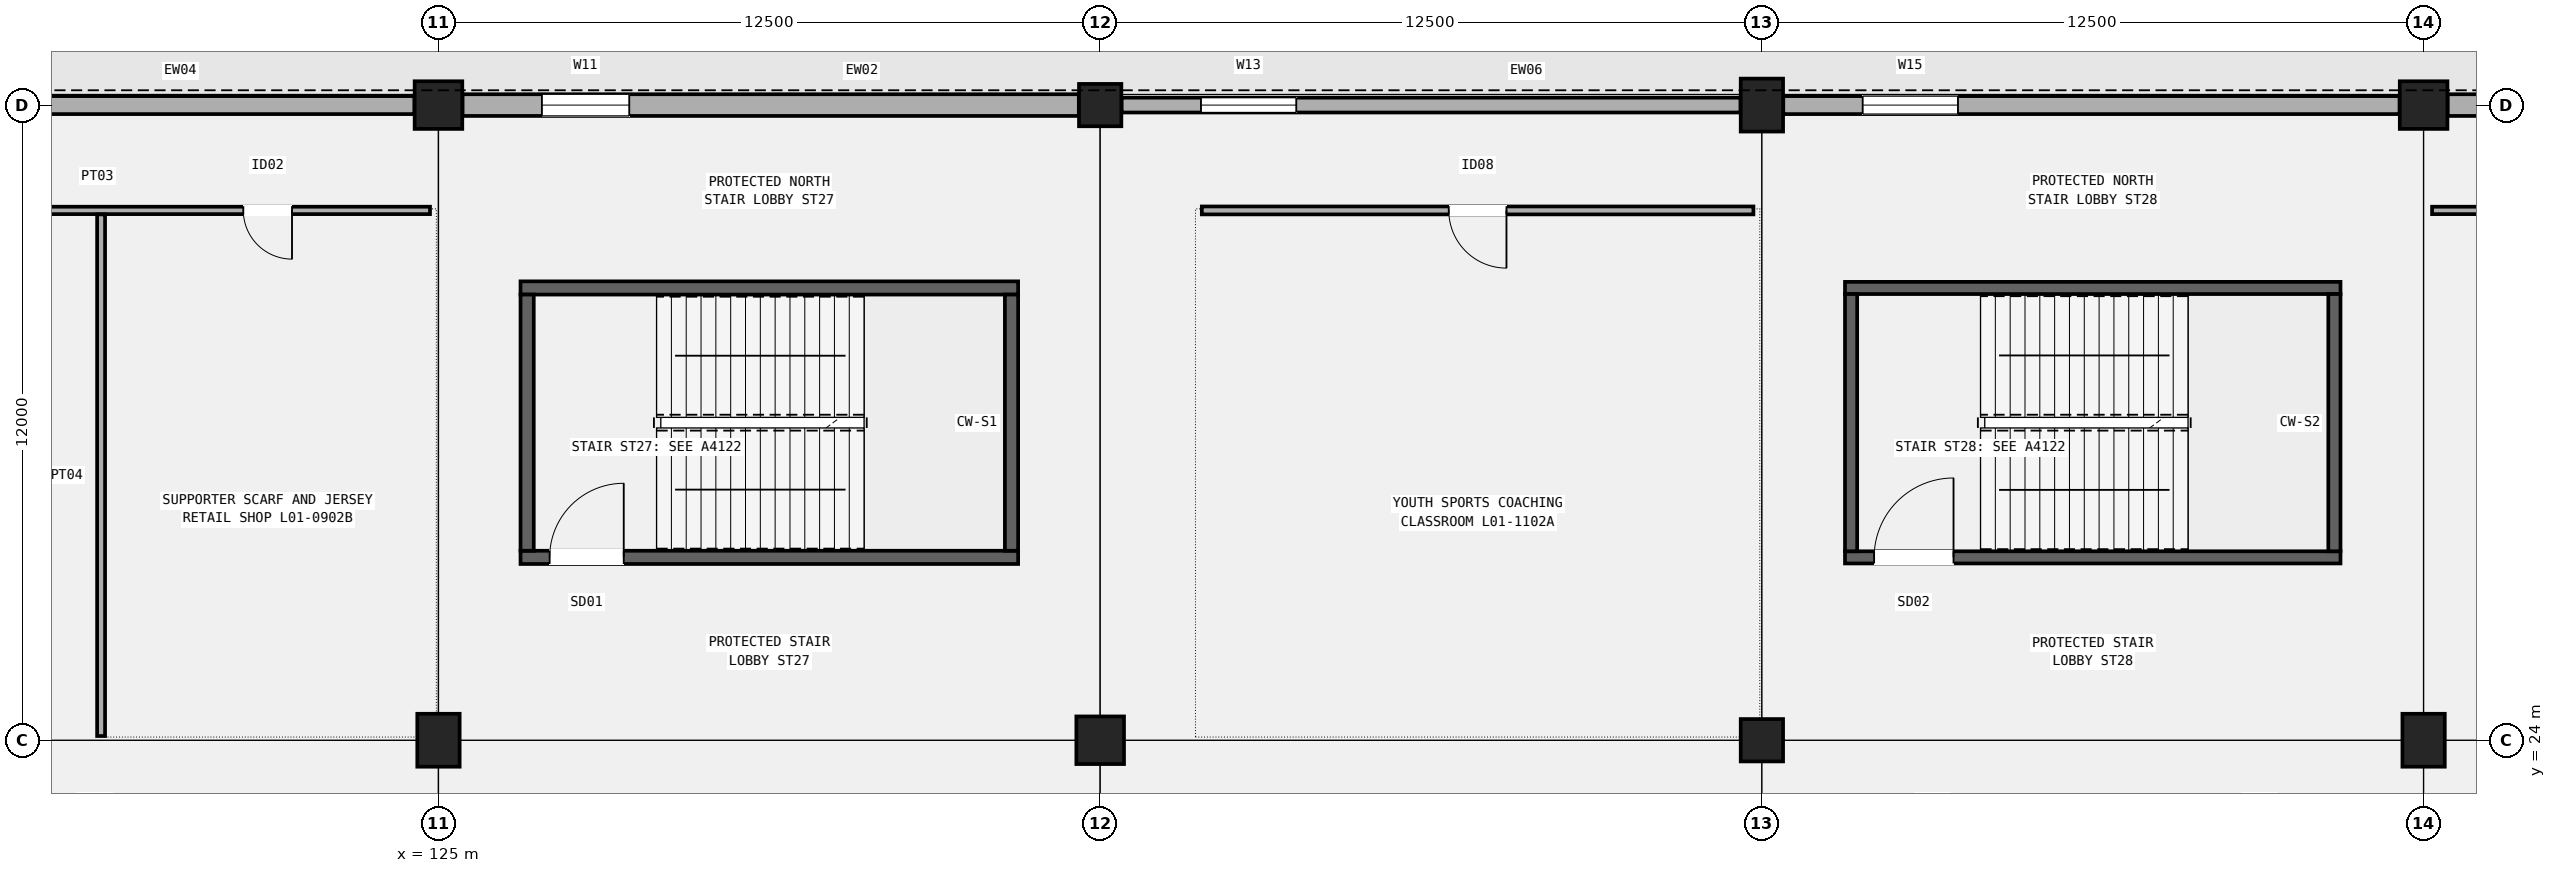
"""IFC4 building model, lengths in metres.
Left out: names, types, materials, properties, quantities, classifications, styles, units other than length and angle.
Written with IfcOpenShell. Run it as: python <this file> out.ifc"""

import sys

from ifc_helpers import new_model, si_unit, direction, frame, frame_2d, origin, origin_2d, place, context, subcontext, project, spatial, rectangle, extrude, element, fill, save


model = new_model("IFC4")
c1 = context("Model", 3, precision=1e-05, world=origin(), true_north=direction((0.0, 1.0)))
c2 = subcontext(c1, "Body", "Model", "MODEL_VIEW")
j1 = project(units=[si_unit("LENGTHUNIT", "METRE"), si_unit("PLANEANGLEUNIT", "RADIAN")], contexts=[c1])
p1 = place(None, origin())
s1 = spatial("IfcSite", under=j1, at=p1, CompositionType="ELEMENT")
p2 = place(p1, origin())
s2 = spatial("IfcBuilding", under=s1, at=p2, CompositionType="ELEMENT")
p3 = place(p2, frame((0.0, 0.0, 5.4)))
s3 = spatial("IfcBuildingStorey", under=s2, at=p3, CompositionType="ELEMENT", Elevation=5.4)
p4 = place(p3, frame((125.0, 24.0, 0.0), z_axis=(0.0, 0.0, 1.0), x_axis=(1.0, 0.0, 0.0)))
e1 = element("IfcColumn", 1, at=p4, inside=s3, PredefinedType="COLUMN", context=c2, shape_type="SweptSolid", body=[
    extrude(rectangle(XDim=0.8, YDim=1.0, at=origin_2d()), origin(), (0.0, 0.0, 1.0), 4.8),
])
for number, where, z_axis, x_axis in (
    (2, (125.0, 36.0, 0.0), (0.0, 0.0, 1.0), (1.0, 0.0, 0.0)),
    (3, (137.5, 24.0, 0.0), (0.0, 0.0, 1.0), (1.0, 0.0, 0.0)),
):
    element("IfcColumn", number, at=place(p3, frame(where, z_axis=z_axis, x_axis=x_axis)), inside=s3, PredefinedType="COLUMN", context=c2, shape_type="SweptSolid", body=[
        extrude(rectangle(XDim=0.9, YDim=0.9, at=origin_2d()), origin(), (0.0, 0.0, 1.0), 4.8),
    ])
for number, where, z_axis, x_axis in (
    (4, (137.5, 36.0, 0.0), (0.0, 0.0, 1.0), (1.0, 0.0, 0.0)),
    (5, (150.0, 24.0, 0.0), (0.0, 0.0, 1.0), (1.0, 0.0, 0.0)),
):
    element("IfcColumn", number, at=place(p3, frame(where, z_axis=z_axis, x_axis=x_axis)), inside=s3, PredefinedType="COLUMN", context=c2, shape_type="SweptSolid", body=[
        extrude(rectangle(XDim=0.8, YDim=0.8, at=origin_2d()), origin(), (0.0, 0.0, 1.0), 4.8),
    ])
for number, where, z_axis, x_axis in (
    (6, (150.0, 36.0, 0.0), (0.0, 0.0, 1.0), (1.0, 0.0, 0.0)),
    (7, (162.5, 24.0, 0.0), (0.0, 0.0, 1.0), (1.0, 0.0, 0.0)),
):
    element("IfcColumn", number, at=place(p3, frame(where, z_axis=z_axis, x_axis=x_axis)), inside=s3, PredefinedType="COLUMN", context=c2, shape_type="SweptSolid", body=[
        extrude(rectangle(XDim=0.8, YDim=1.0, at=origin_2d()), origin(), (0.0, 0.0, 1.0), 4.8),
    ])
p5 = place(p3, frame((162.5, 36.0, 0.0), z_axis=(0.0, 0.0, 1.0), x_axis=(1.0, 0.0, 0.0)))
e8 = element("IfcColumn", 8, at=p5, inside=s3, PredefinedType="COLUMN", context=c2, shape_type="SweptSolid", body=[
    extrude(rectangle(XDim=0.9, YDim=0.9, at=origin_2d()), origin(), (0.0, 0.0, 1.0), 4.8),
])
p6 = place(p3, frame((112.404, 36.0, 0.0), z_axis=(0.0, 0.0, 1.0), x_axis=(1.0, 0.0, 0.0)))
e9 = element("IfcWall", 9, at=p6, inside=s3, PredefinedType="SOLIDWALL", context=c2, shape_type="SweptSolid", body=[
    extrude(rectangle(XDim=12.142, YDim=0.34, at=frame_2d((6.071, 0.0))), origin(), (0.0, 0.0, 1.0), 4.15),
])
p7 = place(p6, frame((1.5, 0.0, 0.95)))
e10 = element("IfcOpeningElement", 10, at=p7, cuts=e9, PredefinedType="OPENING", context=c2, shape_type="SweptSolid", body=[
    extrude(rectangle(XDim=1.5, YDim=1.8, at=frame_2d((0.75, 0.9))), frame((0.0, 0.18, 0.0), z_axis=(0.0, -1.0, 0.0), x_axis=(1.0, 0.0, 0.0)), (0.0, 0.0, 1.0), 0.36),
])
p8 = place(p3, frame((125.454, 36.0, 0.0), z_axis=(0.0, 0.0, 1.0), x_axis=(1.0, 0.0, 0.0)))
e11 = element("IfcWall", 11, at=p8, inside=s3, PredefinedType="SOLIDWALL", context=c2, shape_type="SweptSolid", body=[
    extrude(rectangle(XDim=11.642, YDim=0.41, at=frame_2d((5.821, 0.0))), origin(), (0.0, 0.0, 1.0), 4.2),
])
p9 = place(p8, frame((1.5, 0.0, 0.95)))
e12 = element("IfcOpeningElement", 12, at=p9, cuts=e11, PredefinedType="OPENING", context=c2, shape_type="SweptSolid", body=[
    extrude(rectangle(XDim=1.65, YDim=2.05, at=frame_2d((0.825, 1.025))), frame((0.0, 0.215, 0.0), z_axis=(0.0, -1.0, 0.0), x_axis=(1.0, 0.0, 0.0)), (0.0, 0.0, 1.0), 0.43),
])
p10 = place(p3, frame((137.904, 36.0, 0.0), z_axis=(0.0, 0.0, 1.0), x_axis=(1.0, 0.0, 0.0)))
e13 = element("IfcWall", 13, at=p10, inside=s3, PredefinedType="SOLIDWALL", context=c2, shape_type="SweptSolid", body=[
    extrude(rectangle(XDim=11.692, YDim=0.28, at=frame_2d((5.846, 0.0))), origin(), (0.0, 0.0, 1.0), 4.15),
])
p11 = place(p10, frame((1.5, 0.0, 0.95)))
e14 = element("IfcOpeningElement", 14, at=p11, cuts=e13, PredefinedType="OPENING", context=c2, shape_type="SweptSolid", body=[
    extrude(rectangle(XDim=1.8, YDim=1.75, at=frame_2d((0.9, 0.875))), frame((0.0, 0.15, 0.0), z_axis=(0.0, -1.0, 0.0), x_axis=(1.0, 0.0, 0.0)), (0.0, 0.0, 1.0), 0.3),
])
p12 = place(p3, frame((150.404, 36.0, 0.0), z_axis=(0.0, 0.0, 1.0), x_axis=(1.0, 0.0, 0.0)))
e15 = element("IfcWall", 15, at=p12, inside=s3, PredefinedType="SOLIDWALL", context=c2, shape_type="SweptSolid", body=[
    extrude(rectangle(XDim=11.642, YDim=0.34, at=frame_2d((5.821, 0.0))), origin(), (0.0, 0.0, 1.0), 4.2),
])
p13 = place(p12, frame((1.5, 0.0, 0.95)))
e16 = element("IfcOpeningElement", 16, at=p13, cuts=e15, PredefinedType="OPENING", context=c2, shape_type="SweptSolid", body=[
    extrude(rectangle(XDim=1.8, YDim=2.55, at=frame_2d((0.9, 1.275))), frame((0.0, 0.18, 0.0), z_axis=(0.0, -1.0, 0.0), x_axis=(1.0, 0.0, 0.0)), (0.0, 0.0, 1.0), 0.36),
])
p14 = place(p3, frame((162.954, 36.0, 0.0), z_axis=(0.0, 0.0, 1.0), x_axis=(1.0, 0.0, 0.0)))
e17 = element("IfcWall", 17, at=p14, inside=s3, PredefinedType="SOLIDWALL", context=c2, shape_type="SweptSolid", body=[
    extrude(rectangle(XDim=11.642, YDim=0.41, at=frame_2d((5.821, 0.0))), origin(), (0.0, 0.0, 1.0), 4.15),
])
p15 = place(p14, frame((1.5, 0.0, 0.95)))
e18 = element("IfcOpeningElement", 18, at=p15, cuts=e17, PredefinedType="OPENING", context=c2, shape_type="SweptSolid", body=[
    extrude(rectangle(XDim=1.95, YDim=2.35, at=frame_2d((0.975, 1.175))), frame((0.0, 0.215, 0.0), z_axis=(0.0, -1.0, 0.0), x_axis=(1.0, 0.0, 0.0)), (0.0, 0.0, 1.0), 0.43),
])
p16 = place(p3, frame((126.55, 27.455, 0.0), z_axis=(0.0, 0.0, 1.0), x_axis=(1.0, 0.0, 0.0)))
e19 = element("IfcWall", 19, at=p16, inside=s3, PredefinedType="SHEAR", context=c2, shape_type="SweptSolid", body=[
    extrude(rectangle(XDim=9.4, YDim=0.25, at=frame_2d((4.7, 0.0))), origin(), (0.0, 0.0, 1.0), 4.55),
])
p17 = place(p16, frame((0.55, 0.0, 0.0)))
e20 = element("IfcOpeningElement", 20, at=p17, cuts=e19, PredefinedType="OPENING", context=c2, shape_type="SweptSolid", body=[
    extrude(rectangle(XDim=1.4, YDim=2.15, at=frame_2d((0.7, 1.075))), frame((0.0, 0.135, 0.0), z_axis=(0.0, -1.0, 0.0), x_axis=(1.0, 0.0, 0.0)), (0.0, 0.0, 1.0), 0.27),
])
p18 = place(p3, frame((126.55, 32.545, 0.0), z_axis=(0.0, 0.0, 1.0), x_axis=(1.0, 0.0, 0.0)))
e21 = element("IfcWall", 21, at=p18, inside=s3, PredefinedType="SHEAR", context=c2, shape_type="SweptSolid", body=[
    extrude(rectangle(XDim=9.4, YDim=0.25, at=frame_2d((4.7, 0.0))), origin(), (0.0, 0.0, 1.0), 4.55),
])
for number, where, z_axis, x_axis in (
    (22, (126.675, 27.58, 0.0), (0.0, 0.0, 1.0), (0.0, 1.0, 0.0)),
    (23, (135.825, 27.58, 0.0), (0.0, 0.0, 1.0), (0.0, 1.0, 0.0)),
):
    element("IfcWall", number, at=place(p3, frame(where, z_axis=z_axis, x_axis=x_axis)), inside=s3, PredefinedType="SHEAR", context=c2, shape_type="SweptSolid", body=[
        extrude(rectangle(XDim=4.84, YDim=0.25, at=frame_2d((2.42, 0.0))), origin(), (0.0, 0.0, 1.0), 4.55),
    ])
p19 = place(p3, frame((151.57, 27.455, 0.0), z_axis=(0.0, 0.0, 1.0), x_axis=(1.0, 0.0, 0.0)))
e24 = element("IfcWall", 24, at=p19, inside=s3, PredefinedType="SHEAR", context=c2, shape_type="SweptSolid", body=[
    extrude(rectangle(XDim=9.36, YDim=0.23, at=frame_2d((4.68, 0.0))), origin(), (0.0, 0.0, 1.0), 4.55),
])
p20 = place(p19, frame((0.55, 0.0, 0.0)))
e25 = element("IfcOpeningElement", 25, at=p20, cuts=e24, PredefinedType="OPENING", context=c2, shape_type="SweptSolid", body=[
    extrude(rectangle(XDim=1.5, YDim=2.2, at=frame_2d((0.75, 1.1))), frame((0.0, 0.125, 0.0), z_axis=(0.0, -1.0, 0.0), x_axis=(1.0, 0.0, 0.0)), (0.0, 0.0, 1.0), 0.25),
])
p21 = place(p3, frame((151.57, 32.545, 0.0), z_axis=(0.0, 0.0, 1.0), x_axis=(1.0, 0.0, 0.0)))
e26 = element("IfcWall", 26, at=p21, inside=s3, PredefinedType="SHEAR", context=c2, shape_type="SweptSolid", body=[
    extrude(rectangle(XDim=9.36, YDim=0.23, at=frame_2d((4.68, 0.0))), origin(), (0.0, 0.0, 1.0), 4.55),
])
for number, where, z_axis, x_axis in (
    (27, (151.685, 27.57, 0.0), (0.0, 0.0, 1.0), (0.0, 1.0, 0.0)),
    (28, (160.815, 27.57, 0.0), (0.0, 0.0, 1.0), (0.0, 1.0, 0.0)),
):
    element("IfcWall", number, at=place(p3, frame(where, z_axis=z_axis, x_axis=x_axis)), inside=s3, PredefinedType="SHEAR", context=c2, shape_type="SweptSolid", body=[
        extrude(rectangle(XDim=4.86, YDim=0.23, at=frame_2d((2.43, 0.0))), origin(), (0.0, 0.0, 1.0), 4.55),
    ])
p22 = place(p3, frame((112.16, 34.01, 0.0), z_axis=(0.0, 0.0, 1.0), x_axis=(1.0, 0.0, 0.0)))
e29 = element("IfcWall", 29, at=p22, inside=s3, PredefinedType="PARTITIONING", context=c2, shape_type="SweptSolid", body=[
    extrude(rectangle(XDim=12.68, YDim=0.14, at=frame_2d((6.34, 0.0))), origin(), (0.0, 0.0, 1.0), 3.92),
])
p23 = place(p22, frame((3.643, 0.0, 0.0), z_axis=(0.0, 0.0, 1.0), x_axis=(-1.0, 0.0, 0.0)))
e30 = element("IfcOpeningElement", 30, at=p23, cuts=e29, PredefinedType="OPENING", context=c2, shape_type="SweptSolid", body=[
    extrude(rectangle(XDim=0.9, YDim=2.06, at=frame_2d((0.45, 1.03))), frame((0.0, 0.08, 0.0), z_axis=(0.0, -1.0, 0.0), x_axis=(1.0, 0.0, 0.0)), (0.0, 0.0, 1.0), 0.16),
])
p24 = place(p22, frame((10.073, 0.0, 0.0), z_axis=(0.0, 0.0, 1.0), x_axis=(-1.0, 0.0, 0.0)))
e31 = element("IfcOpeningElement", 31, at=p24, cuts=e29, PredefinedType="OPENING", context=c2, shape_type="SweptSolid", body=[
    extrude(rectangle(XDim=0.92, YDim=2.1, at=frame_2d((0.46, 1.05))), frame((0.0, 0.08, 0.0), z_axis=(0.0, -1.0, 0.0), x_axis=(1.0, 0.0, 0.0)), (0.0, 0.0, 1.0), 0.16),
])
p25 = place(p3, frame((118.627, 24.08, 0.0), z_axis=(0.0, 0.0, 1.0), x_axis=(0.0, 1.0, 0.0)))
e32 = element("IfcWall", 32, at=p25, inside=s3, PredefinedType="PARTITIONING", context=c2, shape_type="SweptSolid", body=[
    extrude(rectangle(XDim=9.855, YDim=0.15, at=frame_2d((4.927, 0.0))), origin(), (0.0, 0.0, 1.0), 3.92),
])
p26 = place(p3, frame((139.42, 34.01, 0.0), z_axis=(0.0, 0.0, 1.0), x_axis=(1.0, 0.0, 0.0)))
e33 = element("IfcWall", 33, at=p26, inside=s3, PredefinedType="PARTITIONING", context=c2, shape_type="SweptSolid", body=[
    extrude(rectangle(XDim=10.42, YDim=0.15, at=frame_2d((5.21, 0.0))), origin(), (0.0, 0.0, 1.0), 3.92),
])
p27 = place(p26, frame((5.755, 0.0, 0.0), z_axis=(0.0, 0.0, 1.0), x_axis=(-1.0, 0.0, 0.0)))
e34 = element("IfcOpeningElement", 34, at=p27, cuts=e33, PredefinedType="OPENING", context=c2, shape_type="SweptSolid", body=[
    extrude(rectangle(XDim=1.09, YDim=2.16, at=frame_2d((0.545, 1.08))), frame((0.0, 0.085, 0.0), z_axis=(0.0, -1.0, 0.0), x_axis=(1.0, 0.0, 0.0)), (0.0, 0.0, 1.0), 0.17),
])
p28 = place(p3, frame((162.66, 34.01, 0.0), z_axis=(0.0, 0.0, 1.0), x_axis=(1.0, 0.0, 0.0)))
e35 = element("IfcWall", 35, at=p28, inside=s3, PredefinedType="PARTITIONING", context=c2, shape_type="SweptSolid", body=[
    extrude(rectangle(XDim=12.18, YDim=0.14, at=frame_2d((6.09, 0.0))), origin(), (0.0, 0.0, 1.0), 3.92),
])
p29 = place(p28, frame((3.731, 0.0, 0.0), z_axis=(0.0, 0.0, 1.0), x_axis=(-1.0, 0.0, 0.0)))
e36 = element("IfcOpeningElement", 36, at=p29, cuts=e35, PredefinedType="OPENING", context=c2, shape_type="SweptSolid", body=[
    extrude(rectangle(XDim=1.33, YDim=2.22, at=frame_2d((0.665, 1.11))), frame((0.0, 0.08, 0.0), z_axis=(0.0, -1.0, 0.0), x_axis=(1.0, 0.0, 0.0)), (0.0, 0.0, 1.0), 0.16),
])
p30 = place(p28, frame((9.916, 0.0, 0.0), z_axis=(0.0, 0.0, 1.0), x_axis=(-1.0, 0.0, 0.0)))
e37 = element("IfcOpeningElement", 37, at=p30, cuts=e35, PredefinedType="OPENING", context=c2, shape_type="SweptSolid", body=[
    extrude(rectangle(XDim=1.36, YDim=2.25, at=frame_2d((0.68, 1.125))), frame((0.0, 0.08, 0.0), z_axis=(0.0, -1.0, 0.0), x_axis=(1.0, 0.0, 0.0)), (0.0, 0.0, 1.0), 0.16),
])
p31 = place(p9, origin())
e38 = element("IfcWindow", 38, at=p31, inside=s3, PartitioningType="SINGLE_PANEL", PredefinedType="WINDOW", context=c2, shape_type="SweptSolid", body=[
    extrude(rectangle(XDim=1.65, YDim=2.05, at=frame_2d((0.825, 1.025))), frame((0.0, 0.03, 0.0), z_axis=(0.0, -1.0, 0.0), x_axis=(1.0, 0.0, 0.0)), (0.0, 0.0, 1.0), 0.06),
])
fill(e12, e38)
p32 = place(p11, origin())
e39 = element("IfcWindow", 39, at=p32, inside=s3, PartitioningType="SINGLE_PANEL", PredefinedType="WINDOW", context=c2, shape_type="SweptSolid", body=[
    extrude(rectangle(XDim=1.8, YDim=1.75, at=frame_2d((0.9, 0.875))), frame((0.0, 0.03, 0.0), z_axis=(0.0, -1.0, 0.0), x_axis=(1.0, 0.0, 0.0)), (0.0, 0.0, 1.0), 0.06),
])
fill(e14, e39)
p33 = place(p13, origin())
e40 = element("IfcWindow", 40, at=p33, inside=s3, PartitioningType="SINGLE_PANEL", PredefinedType="WINDOW", context=c2, shape_type="SweptSolid", body=[
    extrude(rectangle(XDim=1.8, YDim=2.55, at=frame_2d((0.9, 1.275))), frame((0.0, 0.03, 0.0), z_axis=(0.0, -1.0, 0.0), x_axis=(1.0, 0.0, 0.0)), (0.0, 0.0, 1.0), 0.06),
])
fill(e16, e40)
p34 = place(p17, origin())
e41 = element("IfcDoor", 41, at=p34, inside=s3, OperationType="SINGLE_SWING_RIGHT", PredefinedType="DOOR", context=c2, shape_type="SweptSolid", body=[
    extrude(rectangle(XDim=1.4, YDim=2.15, at=frame_2d((0.7, 1.075))), frame((0.0, 0.025, 0.0), z_axis=(0.0, -1.0, 0.0), x_axis=(1.0, 0.0, 0.0)), (0.0, 0.0, 1.0), 0.05),
])
fill(e20, e41)
p35 = place(p20, origin())
e42 = element("IfcDoor", 42, at=p35, inside=s3, OperationType="SINGLE_SWING_RIGHT", PredefinedType="DOOR", context=c2, shape_type="SweptSolid", body=[
    extrude(rectangle(XDim=1.5, YDim=2.2, at=frame_2d((0.75, 1.1))), frame((0.0, 0.025, 0.0), z_axis=(0.0, -1.0, 0.0), x_axis=(1.0, 0.0, 0.0)), (0.0, 0.0, 1.0), 0.05),
])
fill(e25, e42)
p36 = place(p24, origin())
e43 = element("IfcDoor", 43, at=p36, inside=s3, OperationType="SINGLE_SWING_LEFT", PredefinedType="DOOR", context=c2, shape_type="SweptSolid", body=[
    extrude(rectangle(XDim=0.92, YDim=2.1, at=frame_2d((0.46, 1.05))), frame((0.0, 0.025, 0.0), z_axis=(0.0, -1.0, 0.0), x_axis=(1.0, 0.0, 0.0)), (0.0, 0.0, 1.0), 0.05),
])
fill(e31, e43)
p37 = place(p27, origin())
e44 = element("IfcDoor", 44, at=p37, inside=s3, OperationType="SINGLE_SWING_LEFT", PredefinedType="DOOR", context=c2, shape_type="SweptSolid", body=[
    extrude(rectangle(XDim=1.09, YDim=2.16, at=frame_2d((0.545, 1.08))), frame((0.0, 0.025, 0.0), z_axis=(0.0, -1.0, 0.0), x_axis=(1.0, 0.0, 0.0)), (0.0, 0.0, 1.0), 0.05),
])
fill(e34, e44)
save(model, sys.argv[1])
